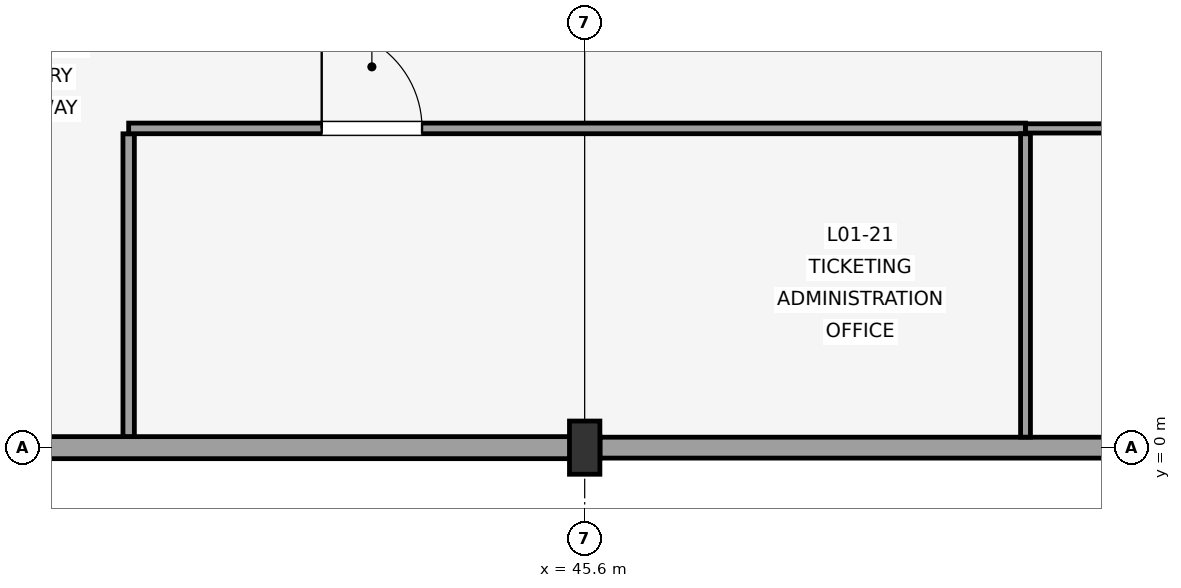
"""IFC4 building model, lengths in metres.
Left out: names, types, materials, properties, quantities, classifications, styles, units other than length and angle.
Written with IfcOpenShell. Run it as: python <this file> out.ifc"""

import sys

from ifc_helpers import new_model, si_unit, direction, frame, frame_2d, origin, origin_2d, place, context, subcontext, project, spatial, rectangle, extrude, element, fill, save


model = new_model("IFC4")
c1 = context("Model", 3, precision=1e-05, world=origin(), true_north=direction((0.0, 1.0)))
c2 = subcontext(c1, "Body", "Model", "MODEL_VIEW")
j1 = project(units=[si_unit("LENGTHUNIT", "METRE"), si_unit("PLANEANGLEUNIT", "RADIAN")], contexts=[c1])
p1 = place(None, origin())
s1 = spatial("IfcSite", under=j1, at=p1, CompositionType="ELEMENT")
p2 = place(p1, origin())
s2 = spatial("IfcBuilding", under=s1, at=p2, CompositionType="ELEMENT")
p3 = place(p2, frame((0.0, 0.0, 4.5)))
s3 = spatial("IfcBuildingStorey", under=s2, at=p3, CompositionType="ELEMENT", Elevation=4.5)
p4 = place(p3, frame((45.6, 0.0, 0.0), z_axis=(0.0, 0.0, 1.0), x_axis=(1.0, 0.0, 0.0)))
e1 = element("IfcColumn", 1, at=p4, inside=s3, PredefinedType="COLUMN", context=c2, shape_type="SweptSolid", body=[
    extrude(rectangle(XDim=0.4, YDim=0.7, at=origin_2d()), origin(), (0.0, 0.0, 1.0), 4.5),
])
p5 = place(p3, frame((36.4, 0.0, 0.0), z_axis=(0.0, 0.0, 1.0), x_axis=(1.0, 0.0, 0.0)))
e2 = element("IfcWall", 2, at=p5, inside=s3, PredefinedType="SOLIDWALL", context=c2, shape_type="SweptSolid", body=[
    extrude(rectangle(XDim=9.4, YDim=0.29, at=frame_2d((4.7, 0.0))), origin(), (0.0, 0.0, 1.0), 3.12),
])
p6 = place(p3, frame((45.801, 0.0, 0.0), z_axis=(0.0, 0.0, 1.0), x_axis=(1.0, 0.0, 0.0)))
e3 = element("IfcWall", 3, at=p6, inside=s3, PredefinedType="SOLIDWALL", context=c2, shape_type="SweptSolid", body=[
    extrude(rectangle(XDim=8.999, YDim=0.275, at=frame_2d((4.5, 0.0))), origin(), (0.0, 0.0, 1.0), 3.12),
])
p7 = place(p3, frame((39.6, 0.146, 0.0), z_axis=(0.0, 0.0, 1.0), x_axis=(0.0, 1.0, 0.0)))
e4 = element("IfcWall", 4, at=p7, inside=s3, PredefinedType="PARTITIONING", context=c2, shape_type="SweptSolid", body=[
    extrude(rectangle(XDim=3.983, YDim=0.15, at=frame_2d((1.991, 0.0))), origin(), (0.0, 0.0, 1.0), 2.7),
])
p8 = place(p3, frame((39.6, 4.2, 0.0), z_axis=(0.0, 0.0, 1.0), x_axis=(1.0, 0.0, 0.0)))
e5 = element("IfcWall", 5, at=p8, inside=s3, PredefinedType="PARTITIONING", context=c2, shape_type="SweptSolid", body=[
    extrude(rectangle(XDim=11.8, YDim=0.14, at=frame_2d((5.9, 0.0))), origin(), (0.0, 0.0, 1.0), 2.7),
])
p9 = place(p8, frame((2.54, 0.0, 0.0)))
e6 = element("IfcOpeningElement", 6, at=p9, cuts=e5, PredefinedType="OPENING", context=c2, shape_type="SweptSolid", body=[
    extrude(rectangle(XDim=1.32, YDim=2.2, at=frame_2d((0.66, 1.1))), frame((0.0, 0.08, 0.0), z_axis=(0.0, -1.0, 0.0), x_axis=(1.0, 0.0, 0.0)), (0.0, 0.0, 1.0), 0.16),
])
p10 = place(p3, frame((51.4, 4.129, 0.0), z_axis=(0.0, 0.0, 1.0), x_axis=(0.0, -1.0, 0.0)))
e7 = element("IfcWall", 7, at=p10, inside=s3, PredefinedType="PARTITIONING", context=c2, shape_type="SweptSolid", body=[
    extrude(rectangle(XDim=3.99, YDim=0.13, at=frame_2d((1.995, 0.0))), origin(), (0.0, 0.0, 1.0), 2.7),
])
p11 = place(p3, frame((51.4, 4.2, 0.0), z_axis=(0.0, 0.0, 1.0), x_axis=(1.0, 0.0, 0.0)))
e8 = element("IfcWall", 8, at=p11, inside=s3, PredefinedType="PARTITIONING", context=c2, shape_type="SweptSolid", body=[
    extrude(rectangle(XDim=11.999, YDim=0.122, at=frame_2d((6.0, 0.0))), origin(), (0.0, 0.0, 1.0), 2.7),
])
p12 = place(p11, frame((6.66, 0.0, 0.0)))
e9 = element("IfcOpeningElement", 9, at=p12, cuts=e8, PredefinedType="OPENING", context=c2, shape_type="SweptSolid", body=[
    extrude(rectangle(XDim=1.48, YDim=2.2, at=frame_2d((0.74, 1.1))), frame((0.0, 0.071, 0.0), z_axis=(0.0, -1.0, 0.0), x_axis=(1.0, 0.0, 0.0)), (0.0, 0.0, 1.0), 0.142),
])
p13 = place(p9, origin())
e10 = element("IfcDoor", 10, at=p13, inside=s3, OperationType="SINGLE_SWING_LEFT", PredefinedType="DOOR", context=c2, shape_type="SweptSolid", body=[
    extrude(rectangle(XDim=1.32, YDim=2.2, at=frame_2d((0.66, 1.1))), frame((0.0, 0.025, 0.0), z_axis=(0.0, -1.0, 0.0), x_axis=(1.0, 0.0, 0.0)), (0.0, 0.0, 1.0), 0.05),
])
fill(e6, e10)
save(model, sys.argv[1])
